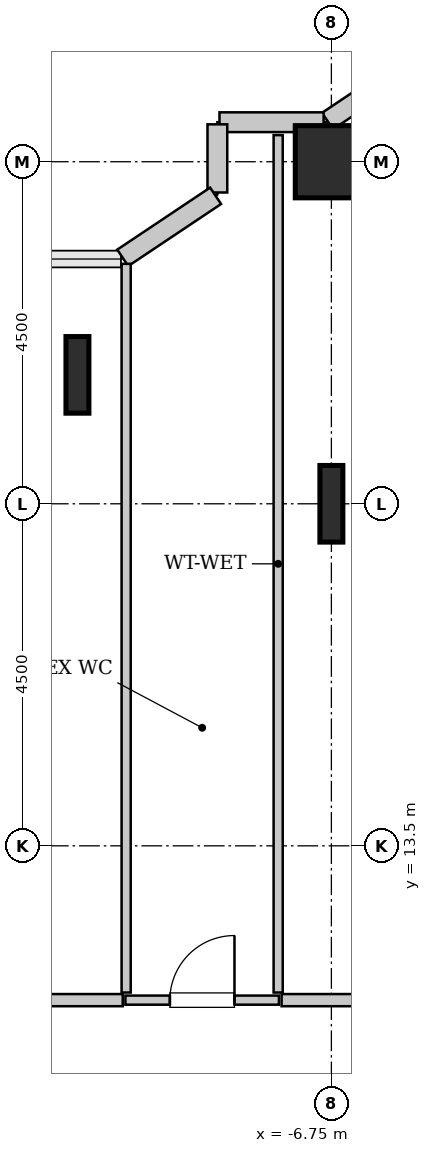
"""IFC4 building model, lengths in metres.
Left out: names, types, materials, properties, quantities, classifications, styles, units other than length and angle.
Written with IfcOpenShell. Run it as: python <this file> out.ifc"""

import sys

from ifc_helpers import new_model, si_unit, direction, frame, frame_2d, origin, origin_2d, place, context, subcontext, project, spatial, rectangle, hollow_rectangle, i_section, extrude, source, transform, mapped, element, fill, save


model = new_model("IFC4")
c1 = context("Model", 3, precision=1e-05, world=origin(), true_north=direction((0.0, 1.0)))
c2 = subcontext(c1, "Body", "Model", "MODEL_VIEW")
j1 = project(units=[si_unit("LENGTHUNIT", "METRE"), si_unit("PLANEANGLEUNIT", "RADIAN")], contexts=[c1])
p1 = place(None, origin())
s1 = spatial("IfcSite", under=j1, at=p1, CompositionType="ELEMENT")
p2 = place(p1, origin())
s2 = spatial("IfcBuilding", under=s1, at=p2, CompositionType="ELEMENT")
p3 = place(p2, frame((0.0, 0.0, 94.6)))
s3 = spatial("IfcBuildingStorey", under=s2, at=p3, CompositionType="ELEMENT", Elevation=94.6)
m1 = source(origin(), c2, "Body", "SweptSolid", [
    extrude(i_section(OverallWidth=0.302, OverallDepth=1.008, WebThickness=0.021, FlangeThickness=0.04, FilletRadius=0.03, at=origin_2d()), origin(), (0.0, 0.0, 1.0), 3.8),
])
for number, where, z_axis, x_axis in (
    (1, (-10.091, 19.696, 0.0), (0.0, 0.0, 1.0), (1.0, 0.0, 0.0)),
    (2, (-6.75, 18.0, 0.0), (0.0, 0.0, 1.0), (1.0, 0.0, 0.0)),
):
    element("IfcColumn", number, at=place(p3, frame(where, z_axis=z_axis, x_axis=x_axis)), inside=s3, PredefinedType="COLUMN", context=c2, shape_type="MappedRepresentation", body=[
        mapped(m1, transform((0.0, 0.0, 0.0), x_axis=(1.0, 0.0, 0.0), y_axis=(0.0, 1.0, 0.0), z_axis=(0.0, 0.0, 1.0), scale=1.0)),
    ])
m2 = source(origin(), c2, "Body", "SweptSolid", [
    extrude(hollow_rectangle(XDim=0.95, YDim=0.95, WallThickness=0.045, InnerFilletRadius=0.045, OuterFilletRadius=0.09, at=origin_2d()), origin(), (0.0, 0.0, 1.0), 3.8),
])
p4 = place(p3, frame((-6.75, 22.5, 0.0), z_axis=(0.0, 0.0, 1.0), x_axis=(1.0, 0.0, 0.0)))
e3 = element("IfcColumn", 3, at=p4, inside=s3, PredefinedType="COLUMN", context=c2, shape_type="MappedRepresentation", body=[
    mapped(m2, transform((0.0, 0.0, 0.0), x_axis=(1.0, 0.0, 0.0), y_axis=(0.0, 1.0, 0.0), z_axis=(0.0, 0.0, 1.0), scale=1.0)),
])
m3 = source(origin(), c2, "Body", "SweptSolid", [
    extrude(rectangle(XDim=0.565, YDim=0.26, at=frame_2d((0.283, 0.0))), origin(), (0.0, 0.0, 1.0), 3.55),
])
p5 = place(p3, frame((-6.331, 23.35, 0.0), z_axis=(0.0, 0.0, 1.0), x_axis=(-0.831651492666, -0.555297933317, 0.0)))
e4 = element("IfcWall", 4, at=p5, inside=s3, PredefinedType="SOLIDWALL", context=c2, shape_type="MappedRepresentation", body=[
    mapped(m3, transform((0.0, 0.0, 0.0), x_axis=(1.0, 0.0, 0.0), y_axis=(0.0, 1.0, 0.0), z_axis=(0.0, 0.0, 1.0), scale=1.0)),
])
m4 = source(origin(), c2, "Body", "SweptSolid", [
    extrude(rectangle(XDim=1.37, YDim=0.26, at=frame_2d((0.685, 0.0))), origin(), (0.0, 0.0, 1.0), 3.55),
])
p6 = place(p3, frame((-6.852, 23.02, 0.0), z_axis=(0.0, 0.0, 1.0), x_axis=(-1.0, 0.0, 0.0)))
e5 = element("IfcWall", 5, at=p6, inside=s3, PredefinedType="SOLIDWALL", context=c2, shape_type="MappedRepresentation", body=[
    mapped(m4, transform((0.0, 0.0, 0.0), x_axis=(1.0, 0.0, 0.0), y_axis=(0.0, 1.0, 0.0), z_axis=(0.0, 0.0, 1.0), scale=1.0)),
])
m5 = source(origin(), c2, "Body", "SweptSolid", [
    extrude(rectangle(XDim=0.897, YDim=0.26, at=frame_2d((0.448, 0.0))), origin(), (0.0, 0.0, 1.0), 3.55),
])
p7 = place(p3, frame((-8.25, 22.992, 0.0), z_axis=(0.0, 0.0, 1.0), x_axis=(0.0, -1.0, 0.0)))
e6 = element("IfcWall", 6, at=p7, inside=s3, PredefinedType="SOLIDWALL", context=c2, shape_type="MappedRepresentation", body=[
    mapped(m5, transform((0.0, 0.0, 0.0), x_axis=(1.0, 0.0, 0.0), y_axis=(0.0, 1.0, 0.0), z_axis=(0.0, 0.0, 1.0), scale=1.0)),
])
m6 = source(origin(), c2, "Body", "SweptSolid", [
    extrude(rectangle(XDim=1.469, YDim=0.26, at=frame_2d((0.734, 0.0))), origin(), (0.0, 0.0, 1.0), 3.55),
])
p8 = place(p3, frame((-8.273, 22.052, 0.0), z_axis=(0.0, 0.0, 1.0), x_axis=(-0.831461760506, -0.555581983884, 0.0)))
e7 = element("IfcWall", 7, at=p8, inside=s3, PredefinedType="SOLIDWALL", context=c2, shape_type="MappedRepresentation", body=[
    mapped(m6, transform((0.0, 0.0, 0.0), x_axis=(1.0, 0.0, 0.0), y_axis=(0.0, 1.0, 0.0), z_axis=(0.0, 0.0, 1.0), scale=1.0)),
])
m7 = source(origin(), c2, "Body", "SweptSolid", [
    extrude(rectangle(XDim=2.02, YDim=0.12, at=frame_2d((1.01, 0.0))), origin(), (0.0, 0.0, 1.0), 3.535),
])
p9 = place(p3, frame((-9.46, 11.47, 0.0), z_axis=(0.0, 0.0, 1.0), x_axis=(1.0, 0.0, 0.0)))
e8 = element("IfcWall", 8, at=p9, inside=s3, PredefinedType="PLUMBINGWALL", context=c2, shape_type="MappedRepresentation", body=[
    mapped(m7, transform((0.0, 0.0, 0.0), x_axis=(1.0, 0.0, 0.0), y_axis=(0.0, 1.0, 0.0), z_axis=(0.0, 0.0, 1.0), scale=1.0)),
])
p10 = place(p9, frame((0.585, 0.0, 0.0)))
e9 = element("IfcOpeningElement", 9, at=p10, cuts=e8, PredefinedType="OPENING", context=c2, shape_type="SweptSolid", body=[
    extrude(rectangle(XDim=0.85, YDim=2.1, at=frame_2d((0.425, 1.05))), frame((0.0, 0.07, 0.0), z_axis=(0.0, -1.0, 0.0), x_axis=(1.0, 0.0, 0.0)), (0.0, 0.0, 1.0), 0.14),
])
m8 = source(origin(), c2, "Body", "SweptSolid", [
    extrude(rectangle(XDim=11.28, YDim=0.12, at=frame_2d((5.64, 0.0))), origin(), (0.0, 0.0, 1.0), 3.535),
])
p11 = place(p3, frame((-7.45, 11.57, 0.0), z_axis=(0.0, 0.0, 1.0), x_axis=(0.0, 1.0, 0.0)))
e10 = element("IfcWall", 10, at=p11, inside=s3, PredefinedType="PLUMBINGWALL", context=c2, shape_type="MappedRepresentation", body=[
    mapped(m8, transform((0.0, 0.0, 0.0), x_axis=(1.0, 0.0, 0.0), y_axis=(0.0, 1.0, 0.0), z_axis=(0.0, 0.0, 1.0), scale=1.0)),
])
m9 = source(origin(), c2, "Body", "SweptSolid", [
    extrude(rectangle(XDim=9.587, YDim=0.12, at=frame_2d((4.793, 0.0))), origin(), (0.0, 0.0, 1.0), 3.535),
])
p12 = place(p3, frame((-9.45, 11.57, 0.0), z_axis=(0.0, 0.0, 1.0), x_axis=(0.0, 1.0, 0.0)))
e11 = element("IfcWall", 11, at=p12, inside=s3, PredefinedType="PLUMBINGWALL", context=c2, shape_type="MappedRepresentation", body=[
    mapped(m9, transform((0.0, 0.0, 0.0), x_axis=(1.0, 0.0, 0.0), y_axis=(0.0, 1.0, 0.0), z_axis=(0.0, 0.0, 1.0), scale=1.0)),
])
m10 = source(origin(), c2, "Body", "SweptSolid", [
    extrude(rectangle(XDim=4.125, YDim=0.16, at=frame_2d((2.062, 0.0))), origin(), (0.0, 0.0, 1.0), 3.535),
])
p13 = place(p3, frame((-13.62, 11.47, 0.0), z_axis=(0.0, 0.0, 1.0), x_axis=(1.0, 0.0, 0.0)))
e12 = element("IfcWall", 12, at=p13, inside=s3, PredefinedType="PARTITIONING", context=c2, shape_type="MappedRepresentation", body=[
    mapped(m10, transform((0.0, 0.0, 0.0), x_axis=(1.0, 0.0, 0.0), y_axis=(0.0, 1.0, 0.0), z_axis=(0.0, 0.0, 1.0), scale=1.0)),
])
p14 = place(p13, frame((1.587, 0.0, 0.0)))
e13 = element("IfcOpeningElement", 13, at=p14, cuts=e12, PredefinedType="OPENING", context=c2, shape_type="SweptSolid", body=[
    extrude(rectangle(XDim=0.95, YDim=2.1, at=frame_2d((0.475, 1.05))), frame((0.0, 0.09, 0.0), z_axis=(0.0, -1.0, 0.0), x_axis=(1.0, 0.0, 0.0)), (0.0, 0.0, 1.0), 0.18),
])
m11 = source(origin(), c2, "Body", "SweptSolid", [
    extrude(rectangle(XDim=5.005, YDim=0.16, at=frame_2d((2.502, 0.0))), origin(), (0.0, 0.0, 1.0), 3.535),
])
p15 = place(p3, frame((-7.405, 11.47, 0.0), z_axis=(0.0, 0.0, 1.0), x_axis=(1.0, 0.0, 0.0)))
e14 = element("IfcWall", 14, at=p15, inside=s3, PredefinedType="PARTITIONING", context=c2, shape_type="MappedRepresentation", body=[
    mapped(m11, transform((0.0, 0.0, 0.0), x_axis=(1.0, 0.0, 0.0), y_axis=(0.0, 1.0, 0.0), z_axis=(0.0, 0.0, 1.0), scale=1.0)),
])
p16 = place(p15, frame((2.028, 0.0, 0.0)))
e15 = element("IfcOpeningElement", 15, at=p16, cuts=e14, PredefinedType="OPENING", context=c2, shape_type="SweptSolid", body=[
    extrude(rectangle(XDim=0.95, YDim=2.1, at=frame_2d((0.475, 1.05))), frame((0.0, 0.09, 0.0), z_axis=(0.0, -1.0, 0.0), x_axis=(1.0, 0.0, 0.0)), (0.0, 0.0, 1.0), 0.18),
])
m12 = source(origin(), c2, "Body", "SweptSolid", [
    extrude(rectangle(XDim=0.85, YDim=2.1, at=frame_2d((0.425, 1.05))), frame((0.0, 0.025, 0.0), z_axis=(0.0, -1.0, 0.0), x_axis=(1.0, 0.0, 0.0)), (0.0, 0.0, 1.0), 0.05),
])
p17 = place(p10, origin())
e16 = element("IfcDoor", 16, at=p17, inside=s3, OperationType="SINGLE_SWING_RIGHT", PredefinedType="DOOR", context=c2, shape_type="MappedRepresentation", body=[
    mapped(m12, transform((0.0, 0.0, 0.0), x_axis=(1.0, 0.0, 0.0), y_axis=(0.0, 1.0, 0.0), z_axis=(0.0, 0.0, 1.0), scale=1.0)),
])
fill(e9, e16)
save(model, sys.argv[1])
